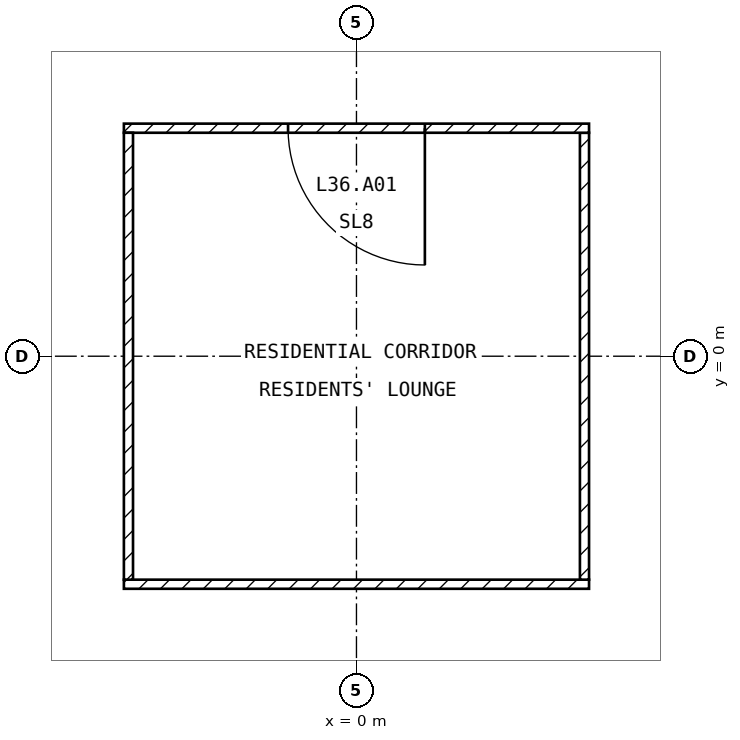
"""IFC4 building model, lengths in metres.
Left out: names, types, materials, properties, quantities, classifications, styles, units other than length and angle.
Written with IfcOpenShell. Run it as: python <this file> out.ifc"""

import sys

from ifc_helpers import new_model, si_unit, direction, frame, frame_2d, origin, place, context, subcontext, project, spatial, rectangle, extrude, element, fill, save


model = new_model("IFC4")
c1 = context("Model", 3, precision=1e-05, world=origin(), true_north=direction((0.0, 1.0)))
c2 = subcontext(c1, "Body", "Model", "MODEL_VIEW")
j1 = project(units=[si_unit("LENGTHUNIT", "METRE"), si_unit("PLANEANGLEUNIT", "RADIAN")], contexts=[c1])
p1 = place(None, origin())
s1 = spatial("IfcSite", under=j1, at=p1, CompositionType="ELEMENT")
p2 = place(p1, origin())
s2 = spatial("IfcBuilding", under=s1, at=p2, CompositionType="ELEMENT")
p3 = place(p2, frame((0.0, 0.0, 147.9)))
s3 = spatial("IfcBuildingStorey", under=s2, at=p3, CompositionType="ELEMENT", Elevation=147.9)
p4 = place(p3, frame((-3.06, -3.0, 0.0), z_axis=(0.0, 0.0, 1.0), x_axis=(1.0, 0.0, 0.0)))
e1 = element("IfcWall", 1, at=p4, inside=s3, PredefinedType="PARTITIONING", context=c2, shape_type="SweptSolid", body=[
    extrude(rectangle(XDim=6.12, YDim=0.12, at=frame_2d((3.06, 0.0))), origin(), (0.0, 0.0, 1.0), 3.25),
])
p5 = place(p3, frame((3.0, -2.94, 0.0), z_axis=(0.0, 0.0, 1.0), x_axis=(0.0, 1.0, 0.0)))
e2 = element("IfcWall", 2, at=p5, inside=s3, PredefinedType="PARTITIONING", context=c2, shape_type="SweptSolid", body=[
    extrude(rectangle(XDim=5.88, YDim=0.12, at=frame_2d((2.94, 0.0))), origin(), (0.0, 0.0, 1.0), 3.25),
])
p6 = place(p3, frame((3.06, 3.0, 0.0), z_axis=(0.0, 0.0, 1.0), x_axis=(-1.0, 0.0, 0.0)))
e3 = element("IfcWall", 3, at=p6, inside=s3, PredefinedType="PARTITIONING", context=c2, shape_type="SweptSolid", body=[
    extrude(rectangle(XDim=6.12, YDim=0.12, at=frame_2d((3.06, 0.0))), origin(), (0.0, 0.0, 1.0), 3.25),
])
p7 = place(p6, frame((2.16, 0.0, 0.0)))
e4 = element("IfcOpeningElement", 4, at=p7, cuts=e3, PredefinedType="OPENING", context=c2, shape_type="SweptSolid", body=[
    extrude(rectangle(XDim=1.8, YDim=2.1, at=frame_2d((0.9, 1.05))), frame((0.0, 0.07, 0.0), z_axis=(0.0, -1.0, 0.0), x_axis=(1.0, 0.0, 0.0)), (0.0, 0.0, 1.0), 0.14),
])
p8 = place(p3, frame((-3.0, 2.94, 0.0), z_axis=(0.0, 0.0, 1.0), x_axis=(0.0, -1.0, 0.0)))
e5 = element("IfcWall", 5, at=p8, inside=s3, PredefinedType="PARTITIONING", context=c2, shape_type="SweptSolid", body=[
    extrude(rectangle(XDim=5.88, YDim=0.12, at=frame_2d((2.94, 0.0))), origin(), (0.0, 0.0, 1.0), 3.25),
])
p9 = place(p7, origin())
e6 = element("IfcDoor", 6, at=p9, inside=s3, OperationType="SINGLE_SWING_LEFT", PredefinedType="DOOR", context=c2, shape_type="SweptSolid", body=[
    extrude(rectangle(XDim=1.8, YDim=2.1, at=frame_2d((0.9, 1.05))), frame((0.0, 0.025, 0.0), z_axis=(0.0, -1.0, 0.0), x_axis=(1.0, 0.0, 0.0)), (0.0, 0.0, 1.0), 0.05),
])
fill(e4, e6)
save(model, sys.argv[1])
